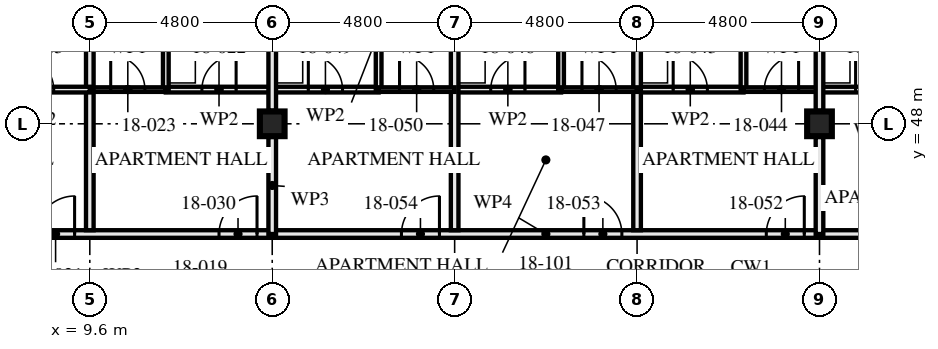
"""IFC4 building model, lengths in metres.
Left out: names, types, materials, properties, quantities, classifications, styles, units other than length and angle.
Written with IfcOpenShell. Run it as: python <this file> out.ifc"""

import sys

from ifc_helpers import new_model, si_unit, direction, frame, frame_2d, origin, origin_2d, place, context, subcontext, project, spatial, rectangle, hollow_rectangle, extrude, element, fill, save


model = new_model("IFC4")
c1 = context("Model", 3, precision=1e-05, world=origin(), true_north=direction((0.0, 1.0)))
c2 = subcontext(c1, "Body", "Model", "MODEL_VIEW")
j1 = project(units=[si_unit("LENGTHUNIT", "METRE"), si_unit("PLANEANGLEUNIT", "RADIAN")], contexts=[c1])
p1 = place(None, origin())
s1 = spatial("IfcSite", under=j1, at=p1, CompositionType="ELEMENT")
p2 = place(p1, origin())
s2 = spatial("IfcBuilding", under=s1, at=p2, CompositionType="ELEMENT")
p3 = place(p2, frame((0.0, 0.0, 69.0)))
s3 = spatial("IfcBuildingStorey", under=s2, at=p3, CompositionType="ELEMENT", Elevation=69.0)
for number, where, z_axis, x_axis in (
    (1, (14.4, 48.0, 0.0), (0.0, 0.0, 1.0), (1.0, 0.0, 0.0)),
    (2, (28.8, 48.0, 0.0), (0.0, 0.0, 1.0), (1.0, 0.0, 0.0)),
):
    element("IfcColumn", number, at=place(p3, frame(where, z_axis=z_axis, x_axis=x_axis)), inside=s3, PredefinedType="COLUMN", context=c2, shape_type="SweptSolid", body=[
        extrude(hollow_rectangle(XDim=0.65, YDim=0.65, WallThickness=0.05, at=origin_2d()), origin(), (0.0, 0.0, 1.0), 3.5),
    ])
p4 = place(p3, frame((11.6, 51.9, 0.0), z_axis=(0.0, 0.0, 1.0), x_axis=(0.0, -1.0, 0.0)))
e3 = element("IfcWall", 3, at=p4, inside=s3, PredefinedType="PARTITIONING", context=c2, shape_type="SweptSolid", body=[
    extrude(rectangle(XDim=3.0, YDim=0.15, at=frame_2d((1.5, 0.0))), origin(), (0.0, 0.0, 1.0), 3.33),
])
p5 = place(p3, frame((14.4, 48.9, 0.0), z_axis=(0.0, 0.0, 1.0), x_axis=(-1.0, 0.0, 0.0)))
e4 = element("IfcWall", 4, at=p5, inside=s3, PredefinedType="PARTITIONING", context=c2, shape_type="SweptSolid", body=[
    extrude(rectangle(XDim=2.8, YDim=0.15, at=frame_2d((1.4, 0.0))), origin(), (0.0, 0.0, 1.0), 3.33),
])
p6 = place(p5, frame((0.95, 0.0, 0.0)))
e5 = element("IfcOpeningElement", 5, at=p6, cuts=e4, PredefinedType="OPENING", context=c2, shape_type="SweptSolid", body=[
    extrude(rectangle(XDim=0.9, YDim=2.1, at=frame_2d((0.45, 1.05))), frame((0.0, 0.085, 0.0), z_axis=(0.0, -1.0, 0.0), x_axis=(1.0, 0.0, 0.0)), (0.0, 0.0, 1.0), 0.171),
])
p7 = place(p3, frame((11.6, 48.9, 0.0), z_axis=(0.0, 0.0, 1.0), x_axis=(-1.0, 0.0, 0.0)))
e6 = element("IfcWall", 6, at=p7, inside=s3, PredefinedType="PARTITIONING", context=c2, shape_type="SweptSolid", body=[
    extrude(rectangle(XDim=2.0, YDim=0.12, at=frame_2d((1.0, 0.0))), origin(), (0.0, 0.0, 1.0), 3.33),
])
p8 = place(p7, frame((0.55, 0.0, 0.0)))
e7 = element("IfcOpeningElement", 7, at=p8, cuts=e6, PredefinedType="OPENING", context=c2, shape_type="SweptSolid", body=[
    extrude(rectangle(XDim=0.9, YDim=2.1, at=frame_2d((0.45, 1.05))), frame((0.0, 0.071, 0.0), z_axis=(0.0, -1.0, 0.0), x_axis=(1.0, 0.0, 0.0)), (0.0, 0.0, 1.0), 0.141),
])
p9 = place(p3, frame((9.6, 57.28, 0.0), z_axis=(0.0, 0.0, 1.0), x_axis=(0.0, -1.0, 0.0)))
e8 = element("IfcWall", 8, at=p9, inside=s3, PredefinedType="PARTITIONING", context=c2, shape_type="SweptSolid", body=[
    extrude(rectangle(XDim=12.08, YDim=0.2, at=frame_2d((6.04, 0.0))), origin(), (0.0, 0.0, 1.0), 2.55),
])
p10 = place(p3, frame((9.6, 48.9, 0.0), z_axis=(0.0, 0.0, 1.0), x_axis=(-1.0, 0.0, 0.0)))
e9 = element("IfcWall", 9, at=p10, inside=s3, PredefinedType="PARTITIONING", context=c2, shape_type="SweptSolid", body=[
    extrude(rectangle(XDim=2.8, YDim=0.15, at=frame_2d((1.4, 0.0))), origin(), (0.0, 0.0, 1.0), 3.33),
])
p11 = place(p10, frame((0.95, 0.0, 0.0)))
e10 = element("IfcOpeningElement", 10, at=p11, cuts=e9, PredefinedType="OPENING", context=c2, shape_type="SweptSolid", body=[
    extrude(rectangle(XDim=0.9, YDim=2.1, at=frame_2d((0.45, 1.05))), frame((0.0, 0.085, 0.0), z_axis=(0.0, -1.0, 0.0), x_axis=(1.0, 0.0, 0.0)), (0.0, 0.0, 1.0), 0.171),
])
p12 = place(p3, frame((14.4, 45.1, 0.0), z_axis=(0.0, 0.0, 1.0), x_axis=(-1.0, 0.0, 0.0)))
e11 = element("IfcWall", 11, at=p12, inside=s3, PredefinedType="PARTITIONING", context=c2, shape_type="SweptSolid", body=[
    extrude(rectangle(XDim=9.6, YDim=0.2, at=frame_2d((4.8, 0.0))), origin(), (0.0, 0.0, 1.0), 3.33),
])
p13 = place(p12, frame((0.4, 0.0, 0.0)))
e12 = element("IfcOpeningElement", 12, at=p13, cuts=e11, PredefinedType="OPENING", context=c2, shape_type="SweptSolid", body=[
    extrude(rectangle(XDim=1.0, YDim=2.1, at=frame_2d((0.5, 1.05))), frame((0.0, 0.111, 0.0), z_axis=(0.0, -1.0, 0.0), x_axis=(1.0, 0.0, 0.0)), (0.0, 0.0, 1.0), 0.221),
])
p14 = place(p12, frame((5.2, 0.0, 0.0)))
e13 = element("IfcOpeningElement", 13, at=p14, cuts=e11, PredefinedType="OPENING", context=c2, shape_type="SweptSolid", body=[
    extrude(rectangle(XDim=1.0, YDim=2.1, at=frame_2d((0.5, 1.05))), frame((0.0, 0.111, 0.0), z_axis=(0.0, -1.0, 0.0), x_axis=(1.0, 0.0, 0.0)), (0.0, 0.0, 1.0), 0.221),
])
p15 = place(p3, frame((26.8, 51.9, 0.0), z_axis=(0.0, 0.0, 1.0), x_axis=(0.0, -1.0, 0.0)))
e14 = element("IfcWall", 14, at=p15, inside=s3, PredefinedType="PARTITIONING", context=c2, shape_type="SweptSolid", body=[
    extrude(rectangle(XDim=3.0, YDim=0.15, at=frame_2d((1.5, 0.0))), origin(), (0.0, 0.0, 1.0), 3.33),
])
p16 = place(p3, frame((26.8, 48.9, 0.0), z_axis=(0.0, 0.0, 1.0), x_axis=(-1.0, 0.0, 0.0)))
e15 = element("IfcWall", 15, at=p16, inside=s3, PredefinedType="PARTITIONING", context=c2, shape_type="SweptSolid", body=[
    extrude(rectangle(XDim=2.8, YDim=0.15, at=frame_2d((1.4, 0.0))), origin(), (0.0, 0.0, 1.0), 3.33),
])
p17 = place(p16, frame((0.95, 0.0, 0.0)))
e16 = element("IfcOpeningElement", 16, at=p17, cuts=e15, PredefinedType="OPENING", context=c2, shape_type="SweptSolid", body=[
    extrude(rectangle(XDim=0.9, YDim=2.1, at=frame_2d((0.45, 1.05))), frame((0.0, 0.085, 0.0), z_axis=(0.0, -1.0, 0.0), x_axis=(1.0, 0.0, 0.0)), (0.0, 0.0, 1.0), 0.171),
])
p18 = place(p3, frame((28.8, 48.9, 0.0), z_axis=(0.0, 0.0, 1.0), x_axis=(-1.0, 0.0, 0.0)))
e17 = element("IfcWall", 17, at=p18, inside=s3, PredefinedType="PARTITIONING", context=c2, shape_type="SweptSolid", body=[
    extrude(rectangle(XDim=2.0, YDim=0.12, at=frame_2d((1.0, 0.0))), origin(), (0.0, 0.0, 1.0), 3.33),
])
p19 = place(p18, frame((0.55, 0.0, 0.0)))
e18 = element("IfcOpeningElement", 18, at=p19, cuts=e17, PredefinedType="OPENING", context=c2, shape_type="SweptSolid", body=[
    extrude(rectangle(XDim=0.9, YDim=2.1, at=frame_2d((0.45, 1.05))), frame((0.0, 0.071, 0.0), z_axis=(0.0, -1.0, 0.0), x_axis=(1.0, 0.0, 0.0)), (0.0, 0.0, 1.0), 0.141),
])
p20 = place(p3, frame((24.0, 57.28, 0.0), z_axis=(0.0, 0.0, 1.0), x_axis=(0.0, -1.0, 0.0)))
e19 = element("IfcWall", 19, at=p20, inside=s3, PredefinedType="PARTITIONING", context=c2, shape_type="SweptSolid", body=[
    extrude(rectangle(XDim=12.08, YDim=0.2, at=frame_2d((6.04, 0.0))), origin(), (0.0, 0.0, 1.0), 2.55),
])
p21 = place(p3, frame((22.0, 51.9, 0.0), z_axis=(0.0, 0.0, 1.0), x_axis=(0.0, -1.0, 0.0)))
e20 = element("IfcWall", 20, at=p21, inside=s3, PredefinedType="PARTITIONING", context=c2, shape_type="SweptSolid", body=[
    extrude(rectangle(XDim=3.0, YDim=0.15, at=frame_2d((1.5, 0.0))), origin(), (0.0, 0.0, 1.0), 3.33),
])
p22 = place(p3, frame((22.0, 48.9, 0.0), z_axis=(0.0, 0.0, 1.0), x_axis=(-1.0, 0.0, 0.0)))
e21 = element("IfcWall", 21, at=p22, inside=s3, PredefinedType="PARTITIONING", context=c2, shape_type="SweptSolid", body=[
    extrude(rectangle(XDim=2.8, YDim=0.15, at=frame_2d((1.4, 0.0))), origin(), (0.0, 0.0, 1.0), 3.33),
])
p23 = place(p22, frame((0.95, 0.0, 0.0)))
e22 = element("IfcOpeningElement", 22, at=p23, cuts=e21, PredefinedType="OPENING", context=c2, shape_type="SweptSolid", body=[
    extrude(rectangle(XDim=0.9, YDim=2.1, at=frame_2d((0.45, 1.05))), frame((0.0, 0.085, 0.0), z_axis=(0.0, -1.0, 0.0), x_axis=(1.0, 0.0, 0.0)), (0.0, 0.0, 1.0), 0.171),
])
p24 = place(p3, frame((24.0, 48.9, 0.0), z_axis=(0.0, 0.0, 1.0), x_axis=(-1.0, 0.0, 0.0)))
e23 = element("IfcWall", 23, at=p24, inside=s3, PredefinedType="PARTITIONING", context=c2, shape_type="SweptSolid", body=[
    extrude(rectangle(XDim=2.0, YDim=0.12, at=frame_2d((1.0, 0.0))), origin(), (0.0, 0.0, 1.0), 3.33),
])
p25 = place(p24, frame((0.55, 0.0, 0.0)))
e24 = element("IfcOpeningElement", 24, at=p25, cuts=e23, PredefinedType="OPENING", context=c2, shape_type="SweptSolid", body=[
    extrude(rectangle(XDim=0.9, YDim=2.1, at=frame_2d((0.45, 1.05))), frame((0.0, 0.071, 0.0), z_axis=(0.0, -1.0, 0.0), x_axis=(1.0, 0.0, 0.0)), (0.0, 0.0, 1.0), 0.141),
])
p26 = place(p3, frame((19.2, 57.28, 0.0), z_axis=(0.0, 0.0, 1.0), x_axis=(0.0, -1.0, 0.0)))
e25 = element("IfcWall", 25, at=p26, inside=s3, PredefinedType="PARTITIONING", context=c2, shape_type="SweptSolid", body=[
    extrude(rectangle(XDim=12.08, YDim=0.2, at=frame_2d((6.04, 0.0))), origin(), (0.0, 0.0, 1.0), 2.55),
])
p27 = place(p3, frame((17.2, 51.9, 0.0), z_axis=(0.0, 0.0, 1.0), x_axis=(0.0, -1.0, 0.0)))
e26 = element("IfcWall", 26, at=p27, inside=s3, PredefinedType="PARTITIONING", context=c2, shape_type="SweptSolid", body=[
    extrude(rectangle(XDim=3.0, YDim=0.15, at=frame_2d((1.5, 0.0))), origin(), (0.0, 0.0, 1.0), 3.33),
])
p28 = place(p3, frame((17.2, 48.9, 0.0), z_axis=(0.0, 0.0, 1.0), x_axis=(-1.0, 0.0, 0.0)))
e27 = element("IfcWall", 27, at=p28, inside=s3, PredefinedType="PARTITIONING", context=c2, shape_type="SweptSolid", body=[
    extrude(rectangle(XDim=2.8, YDim=0.15, at=frame_2d((1.4, 0.0))), origin(), (0.0, 0.0, 1.0), 3.33),
])
p29 = place(p28, frame((0.95, 0.0, 0.0)))
e28 = element("IfcOpeningElement", 28, at=p29, cuts=e27, PredefinedType="OPENING", context=c2, shape_type="SweptSolid", body=[
    extrude(rectangle(XDim=0.9, YDim=2.1, at=frame_2d((0.45, 1.05))), frame((0.0, 0.085, 0.0), z_axis=(0.0, -1.0, 0.0), x_axis=(1.0, 0.0, 0.0)), (0.0, 0.0, 1.0), 0.171),
])
p30 = place(p3, frame((19.2, 48.9, 0.0), z_axis=(0.0, 0.0, 1.0), x_axis=(-1.0, 0.0, 0.0)))
e29 = element("IfcWall", 29, at=p30, inside=s3, PredefinedType="PARTITIONING", context=c2, shape_type="SweptSolid", body=[
    extrude(rectangle(XDim=2.0, YDim=0.12, at=frame_2d((1.0, 0.0))), origin(), (0.0, 0.0, 1.0), 3.33),
])
p31 = place(p30, frame((0.55, 0.0, 0.0)))
e30 = element("IfcOpeningElement", 30, at=p31, cuts=e29, PredefinedType="OPENING", context=c2, shape_type="SweptSolid", body=[
    extrude(rectangle(XDim=0.9, YDim=2.1, at=frame_2d((0.45, 1.05))), frame((0.0, 0.071, 0.0), z_axis=(0.0, -1.0, 0.0), x_axis=(1.0, 0.0, 0.0)), (0.0, 0.0, 1.0), 0.141),
])
p32 = place(p3, frame((28.8, 45.1, 0.0), z_axis=(0.0, 0.0, 1.0), x_axis=(-1.0, 0.0, 0.0)))
e31 = element("IfcWall", 31, at=p32, inside=s3, PredefinedType="PARTITIONING", context=c2, shape_type="SweptSolid", body=[
    extrude(rectangle(XDim=14.4, YDim=0.2, at=frame_2d((7.2, 0.0))), origin(), (0.0, 0.0, 1.0), 3.33),
])
p33 = place(p32, frame((0.4, 0.0, 0.0)))
e32 = element("IfcOpeningElement", 32, at=p33, cuts=e31, PredefinedType="OPENING", context=c2, shape_type="SweptSolid", body=[
    extrude(rectangle(XDim=1.0, YDim=2.1, at=frame_2d((0.5, 1.05))), frame((0.0, 0.111, 0.0), z_axis=(0.0, -1.0, 0.0), x_axis=(1.0, 0.0, 0.0)), (0.0, 0.0, 1.0), 0.221),
])
p34 = place(p32, frame((5.2, 0.0, 0.0)))
e33 = element("IfcOpeningElement", 33, at=p34, cuts=e31, PredefinedType="OPENING", context=c2, shape_type="SweptSolid", body=[
    extrude(rectangle(XDim=1.0, YDim=2.1, at=frame_2d((0.5, 1.05))), frame((0.0, 0.111, 0.0), z_axis=(0.0, -1.0, 0.0), x_axis=(1.0, 0.0, 0.0)), (0.0, 0.0, 1.0), 0.221),
])
p35 = place(p32, frame((10.0, 0.0, 0.0)))
e34 = element("IfcOpeningElement", 34, at=p35, cuts=e31, PredefinedType="OPENING", context=c2, shape_type="SweptSolid", body=[
    extrude(rectangle(XDim=1.0, YDim=2.1, at=frame_2d((0.5, 1.05))), frame((0.0, 0.111, 0.0), z_axis=(0.0, -1.0, 0.0), x_axis=(1.0, 0.0, 0.0)), (0.0, 0.0, 1.0), 0.221),
])
p36 = place(p3, frame((31.6, 48.9, 0.0), z_axis=(0.0, 0.0, 1.0), x_axis=(-1.0, 0.0, 0.0)))
e35 = element("IfcWall", 35, at=p36, inside=s3, PredefinedType="PARTITIONING", context=c2, shape_type="SweptSolid", body=[
    extrude(rectangle(XDim=2.8, YDim=0.15, at=frame_2d((1.4, 0.0))), origin(), (0.0, 0.0, 1.0), 3.33),
])
p37 = place(p36, frame((0.95, 0.0, 0.0)))
e36 = element("IfcOpeningElement", 36, at=p37, cuts=e35, PredefinedType="OPENING", context=c2, shape_type="SweptSolid", body=[
    extrude(rectangle(XDim=0.9, YDim=2.1, at=frame_2d((0.45, 1.05))), frame((0.0, 0.085, 0.0), z_axis=(0.0, -1.0, 0.0), x_axis=(1.0, 0.0, 0.0)), (0.0, 0.0, 1.0), 0.171),
])
p38 = place(p3, frame((38.4, 45.1, 0.0), z_axis=(0.0, 0.0, 1.0), x_axis=(-1.0, 0.0, 0.0)))
e37 = element("IfcWall", 37, at=p38, inside=s3, PredefinedType="PARTITIONING", context=c2, shape_type="SweptSolid", body=[
    extrude(rectangle(XDim=9.6, YDim=0.2, at=frame_2d((4.8, 0.0))), origin(), (0.0, 0.0, 1.0), 3.33),
])
p39 = place(p38, frame((0.4, 0.0, 0.0)))
e38 = element("IfcOpeningElement", 38, at=p39, cuts=e37, PredefinedType="OPENING", context=c2, shape_type="SweptSolid", body=[
    extrude(rectangle(XDim=1.0, YDim=2.1, at=frame_2d((0.5, 1.05))), frame((0.0, 0.111, 0.0), z_axis=(0.0, -1.0, 0.0), x_axis=(1.0, 0.0, 0.0)), (0.0, 0.0, 1.0), 0.221),
])
p40 = place(p38, frame((5.2, 0.0, 0.0)))
e39 = element("IfcOpeningElement", 39, at=p40, cuts=e37, PredefinedType="OPENING", context=c2, shape_type="SweptSolid", body=[
    extrude(rectangle(XDim=1.0, YDim=2.1, at=frame_2d((0.5, 1.05))), frame((0.0, 0.111, 0.0), z_axis=(0.0, -1.0, 0.0), x_axis=(1.0, 0.0, 0.0)), (0.0, 0.0, 1.0), 0.221),
])
p41 = place(p3, frame((14.4, 45.1, 0.0), z_axis=(0.0, 0.0, 1.0), x_axis=(0.0, 1.0, 0.0)))
e40 = element("IfcWall", 40, at=p41, inside=s3, PredefinedType="PARTITIONING", context=c2, shape_type="SweptSolid", body=[
    extrude(rectangle(XDim=2.555, YDim=0.2, at=frame_2d((1.277, 0.0))), origin(), (0.0, 0.0, 1.0), 2.32),
])
p42 = place(p3, frame((14.4, 48.345, 0.0), z_axis=(0.0, 0.0, 1.0), x_axis=(0.0, 1.0, 0.0)))
e41 = element("IfcWall", 41, at=p42, inside=s3, PredefinedType="PARTITIONING", context=c2, shape_type="SweptSolid", body=[
    extrude(rectangle(XDim=4.11, YDim=0.2, at=frame_2d((2.055, 0.0))), origin(), (0.0, 0.0, 1.0), 2.32),
])
p43 = place(p3, frame((28.8, 45.1, 0.0), z_axis=(0.0, 0.0, 1.0), x_axis=(0.0, 1.0, 0.0)))
e42 = element("IfcWall", 42, at=p43, inside=s3, PredefinedType="PARTITIONING", context=c2, shape_type="SweptSolid", body=[
    extrude(rectangle(XDim=2.555, YDim=0.2, at=frame_2d((1.277, 0.0))), origin(), (0.0, 0.0, 1.0), 2.32),
])
p44 = place(p3, frame((28.8, 48.345, 0.0), z_axis=(0.0, 0.0, 1.0), x_axis=(0.0, 1.0, 0.0)))
e43 = element("IfcWall", 43, at=p44, inside=s3, PredefinedType="PARTITIONING", context=c2, shape_type="SweptSolid", body=[
    extrude(rectangle(XDim=4.11, YDim=0.2, at=frame_2d((2.055, 0.0))), origin(), (0.0, 0.0, 1.0), 2.32),
])
p45 = place(p6, frame((0.9, 0.0, 0.0), z_axis=(0.0, 0.0, 1.0), x_axis=(-1.0, 0.0, 0.0)))
e44 = element("IfcDoor", 44, at=p45, inside=s3, OperationType="SINGLE_SWING_LEFT", PredefinedType="DOOR", context=c2, shape_type="SweptSolid", body=[
    extrude(rectangle(XDim=0.9, YDim=2.1, at=frame_2d((0.45, 1.05))), frame((0.0, 0.022, 0.0), z_axis=(0.0, -1.0, 0.0), x_axis=(1.0, 0.0, 0.0)), (0.0, 0.0, 1.0), 0.044),
])
fill(e5, e44)
p46 = place(p8, frame((0.9, 0.0, 0.0), z_axis=(0.0, 0.0, 1.0), x_axis=(-1.0, 0.0, 0.0)))
e45 = element("IfcDoor", 45, at=p46, inside=s3, OperationType="SINGLE_SWING_RIGHT", PredefinedType="DOOR", context=c2, shape_type="SweptSolid", body=[
    extrude(rectangle(XDim=0.9, YDim=2.1, at=frame_2d((0.45, 1.05))), frame((0.0, 0.022, 0.0), z_axis=(0.0, -1.0, 0.0), x_axis=(1.0, 0.0, 0.0)), (0.0, 0.0, 1.0), 0.044),
])
fill(e7, e45)
p47 = place(p11, frame((0.9, 0.0, 0.0), z_axis=(0.0, 0.0, 1.0), x_axis=(-1.0, 0.0, 0.0)))
e46 = element("IfcDoor", 46, at=p47, inside=s3, OperationType="SINGLE_SWING_RIGHT", PredefinedType="DOOR", context=c2, shape_type="SweptSolid", body=[
    extrude(rectangle(XDim=0.9, YDim=2.1, at=frame_2d((0.45, 1.05))), frame((0.0, 0.022, 0.0), z_axis=(0.0, -1.0, 0.0), x_axis=(1.0, 0.0, 0.0)), (0.0, 0.0, 1.0), 0.044),
])
fill(e10, e46)
p48 = place(p13, frame((1.0, 0.0, 0.0), z_axis=(0.0, 0.0, 1.0), x_axis=(-1.0, 0.0, 0.0)))
e47 = element("IfcDoor", 47, at=p48, inside=s3, OperationType="SINGLE_SWING_LEFT", PredefinedType="DOOR", context=c2, shape_type="SweptSolid", body=[
    extrude(rectangle(XDim=1.0, YDim=2.1, at=frame_2d((0.5, 1.05))), frame((0.0, 0.027, 0.0), z_axis=(0.0, -1.0, 0.0), x_axis=(1.0, 0.0, 0.0)), (0.0, 0.0, 1.0), 0.054),
])
fill(e12, e47)
p49 = place(p14, frame((1.0, 0.0, 0.0), z_axis=(0.0, 0.0, 1.0), x_axis=(-1.0, 0.0, 0.0)))
e48 = element("IfcDoor", 48, at=p49, inside=s3, OperationType="SINGLE_SWING_LEFT", PredefinedType="DOOR", context=c2, shape_type="SweptSolid", body=[
    extrude(rectangle(XDim=1.0, YDim=2.1, at=frame_2d((0.5, 1.05))), frame((0.0, 0.027, 0.0), z_axis=(0.0, -1.0, 0.0), x_axis=(1.0, 0.0, 0.0)), (0.0, 0.0, 1.0), 0.054),
])
fill(e13, e48)
p50 = place(p17, frame((0.9, 0.0, 0.0), z_axis=(0.0, 0.0, 1.0), x_axis=(-1.0, 0.0, 0.0)))
e49 = element("IfcDoor", 49, at=p50, inside=s3, OperationType="SINGLE_SWING_RIGHT", PredefinedType="DOOR", context=c2, shape_type="SweptSolid", body=[
    extrude(rectangle(XDim=0.9, YDim=2.1, at=frame_2d((0.45, 1.05))), frame((0.0, 0.022, 0.0), z_axis=(0.0, -1.0, 0.0), x_axis=(1.0, 0.0, 0.0)), (0.0, 0.0, 1.0), 0.044),
])
fill(e16, e49)
p51 = place(p19, frame((0.9, 0.0, 0.0), z_axis=(0.0, 0.0, 1.0), x_axis=(-1.0, 0.0, 0.0)))
e50 = element("IfcDoor", 50, at=p51, inside=s3, OperationType="SINGLE_SWING_LEFT", PredefinedType="DOOR", context=c2, shape_type="SweptSolid", body=[
    extrude(rectangle(XDim=0.9, YDim=2.1, at=frame_2d((0.45, 1.05))), frame((0.0, 0.022, 0.0), z_axis=(0.0, -1.0, 0.0), x_axis=(1.0, 0.0, 0.0)), (0.0, 0.0, 1.0), 0.044),
])
fill(e18, e50)
p52 = place(p23, frame((0.9, 0.0, 0.0), z_axis=(0.0, 0.0, 1.0), x_axis=(-1.0, 0.0, 0.0)))
e51 = element("IfcDoor", 51, at=p52, inside=s3, OperationType="SINGLE_SWING_LEFT", PredefinedType="DOOR", context=c2, shape_type="SweptSolid", body=[
    extrude(rectangle(XDim=0.9, YDim=2.1, at=frame_2d((0.45, 1.05))), frame((0.0, 0.022, 0.0), z_axis=(0.0, -1.0, 0.0), x_axis=(1.0, 0.0, 0.0)), (0.0, 0.0, 1.0), 0.044),
])
fill(e22, e51)
p53 = place(p25, frame((0.9, 0.0, 0.0), z_axis=(0.0, 0.0, 1.0), x_axis=(-1.0, 0.0, 0.0)))
e52 = element("IfcDoor", 52, at=p53, inside=s3, OperationType="SINGLE_SWING_RIGHT", PredefinedType="DOOR", context=c2, shape_type="SweptSolid", body=[
    extrude(rectangle(XDim=0.9, YDim=2.1, at=frame_2d((0.45, 1.05))), frame((0.0, 0.022, 0.0), z_axis=(0.0, -1.0, 0.0), x_axis=(1.0, 0.0, 0.0)), (0.0, 0.0, 1.0), 0.044),
])
fill(e24, e52)
p54 = place(p29, frame((0.9, 0.0, 0.0), z_axis=(0.0, 0.0, 1.0), x_axis=(-1.0, 0.0, 0.0)))
e53 = element("IfcDoor", 53, at=p54, inside=s3, OperationType="SINGLE_SWING_RIGHT", PredefinedType="DOOR", context=c2, shape_type="SweptSolid", body=[
    extrude(rectangle(XDim=0.9, YDim=2.1, at=frame_2d((0.45, 1.05))), frame((0.0, 0.022, 0.0), z_axis=(0.0, -1.0, 0.0), x_axis=(1.0, 0.0, 0.0)), (0.0, 0.0, 1.0), 0.044),
])
fill(e28, e53)
p55 = place(p31, frame((0.9, 0.0, 0.0), z_axis=(0.0, 0.0, 1.0), x_axis=(-1.0, 0.0, 0.0)))
e54 = element("IfcDoor", 54, at=p55, inside=s3, OperationType="SINGLE_SWING_RIGHT", PredefinedType="DOOR", context=c2, shape_type="SweptSolid", body=[
    extrude(rectangle(XDim=0.9, YDim=2.1, at=frame_2d((0.45, 1.05))), frame((0.0, 0.022, 0.0), z_axis=(0.0, -1.0, 0.0), x_axis=(1.0, 0.0, 0.0)), (0.0, 0.0, 1.0), 0.044),
])
fill(e30, e54)
p56 = place(p33, frame((1.0, 0.0, 0.0), z_axis=(0.0, 0.0, 1.0), x_axis=(-1.0, 0.0, 0.0)))
e55 = element("IfcDoor", 55, at=p56, inside=s3, OperationType="SINGLE_SWING_LEFT", PredefinedType="DOOR", context=c2, shape_type="SweptSolid", body=[
    extrude(rectangle(XDim=1.0, YDim=2.1, at=frame_2d((0.5, 1.05))), frame((0.0, 0.027, 0.0), z_axis=(0.0, -1.0, 0.0), x_axis=(1.0, 0.0, 0.0)), (0.0, 0.0, 1.0), 0.054),
])
fill(e32, e55)
p57 = place(p34, frame((1.0, 0.0, 0.0), z_axis=(0.0, 0.0, 1.0), x_axis=(-1.0, 0.0, 0.0)))
e56 = element("IfcDoor", 56, at=p57, inside=s3, OperationType="SINGLE_SWING_RIGHT", PredefinedType="DOOR", context=c2, shape_type="SweptSolid", body=[
    extrude(rectangle(XDim=1.0, YDim=2.1, at=frame_2d((0.5, 1.05))), frame((0.0, 0.027, 0.0), z_axis=(0.0, -1.0, 0.0), x_axis=(1.0, 0.0, 0.0)), (0.0, 0.0, 1.0), 0.054),
])
fill(e33, e56)
p58 = place(p35, frame((1.0, 0.0, 0.0), z_axis=(0.0, 0.0, 1.0), x_axis=(-1.0, 0.0, 0.0)))
e57 = element("IfcDoor", 57, at=p58, inside=s3, OperationType="SINGLE_SWING_LEFT", PredefinedType="DOOR", context=c2, shape_type="SweptSolid", body=[
    extrude(rectangle(XDim=1.0, YDim=2.1, at=frame_2d((0.5, 1.05))), frame((0.0, 0.027, 0.0), z_axis=(0.0, -1.0, 0.0), x_axis=(1.0, 0.0, 0.0)), (0.0, 0.0, 1.0), 0.054),
])
fill(e34, e57)
p59 = place(p37, frame((0.9, 0.0, 0.0), z_axis=(0.0, 0.0, 1.0), x_axis=(-1.0, 0.0, 0.0)))
e58 = element("IfcDoor", 58, at=p59, inside=s3, OperationType="SINGLE_SWING_RIGHT", PredefinedType="DOOR", context=c2, shape_type="SweptSolid", body=[
    extrude(rectangle(XDim=0.9, YDim=2.1, at=frame_2d((0.45, 1.05))), frame((0.0, 0.022, 0.0), z_axis=(0.0, -1.0, 0.0), x_axis=(1.0, 0.0, 0.0)), (0.0, 0.0, 1.0), 0.044),
])
fill(e36, e58)
save(model, sys.argv[1])
